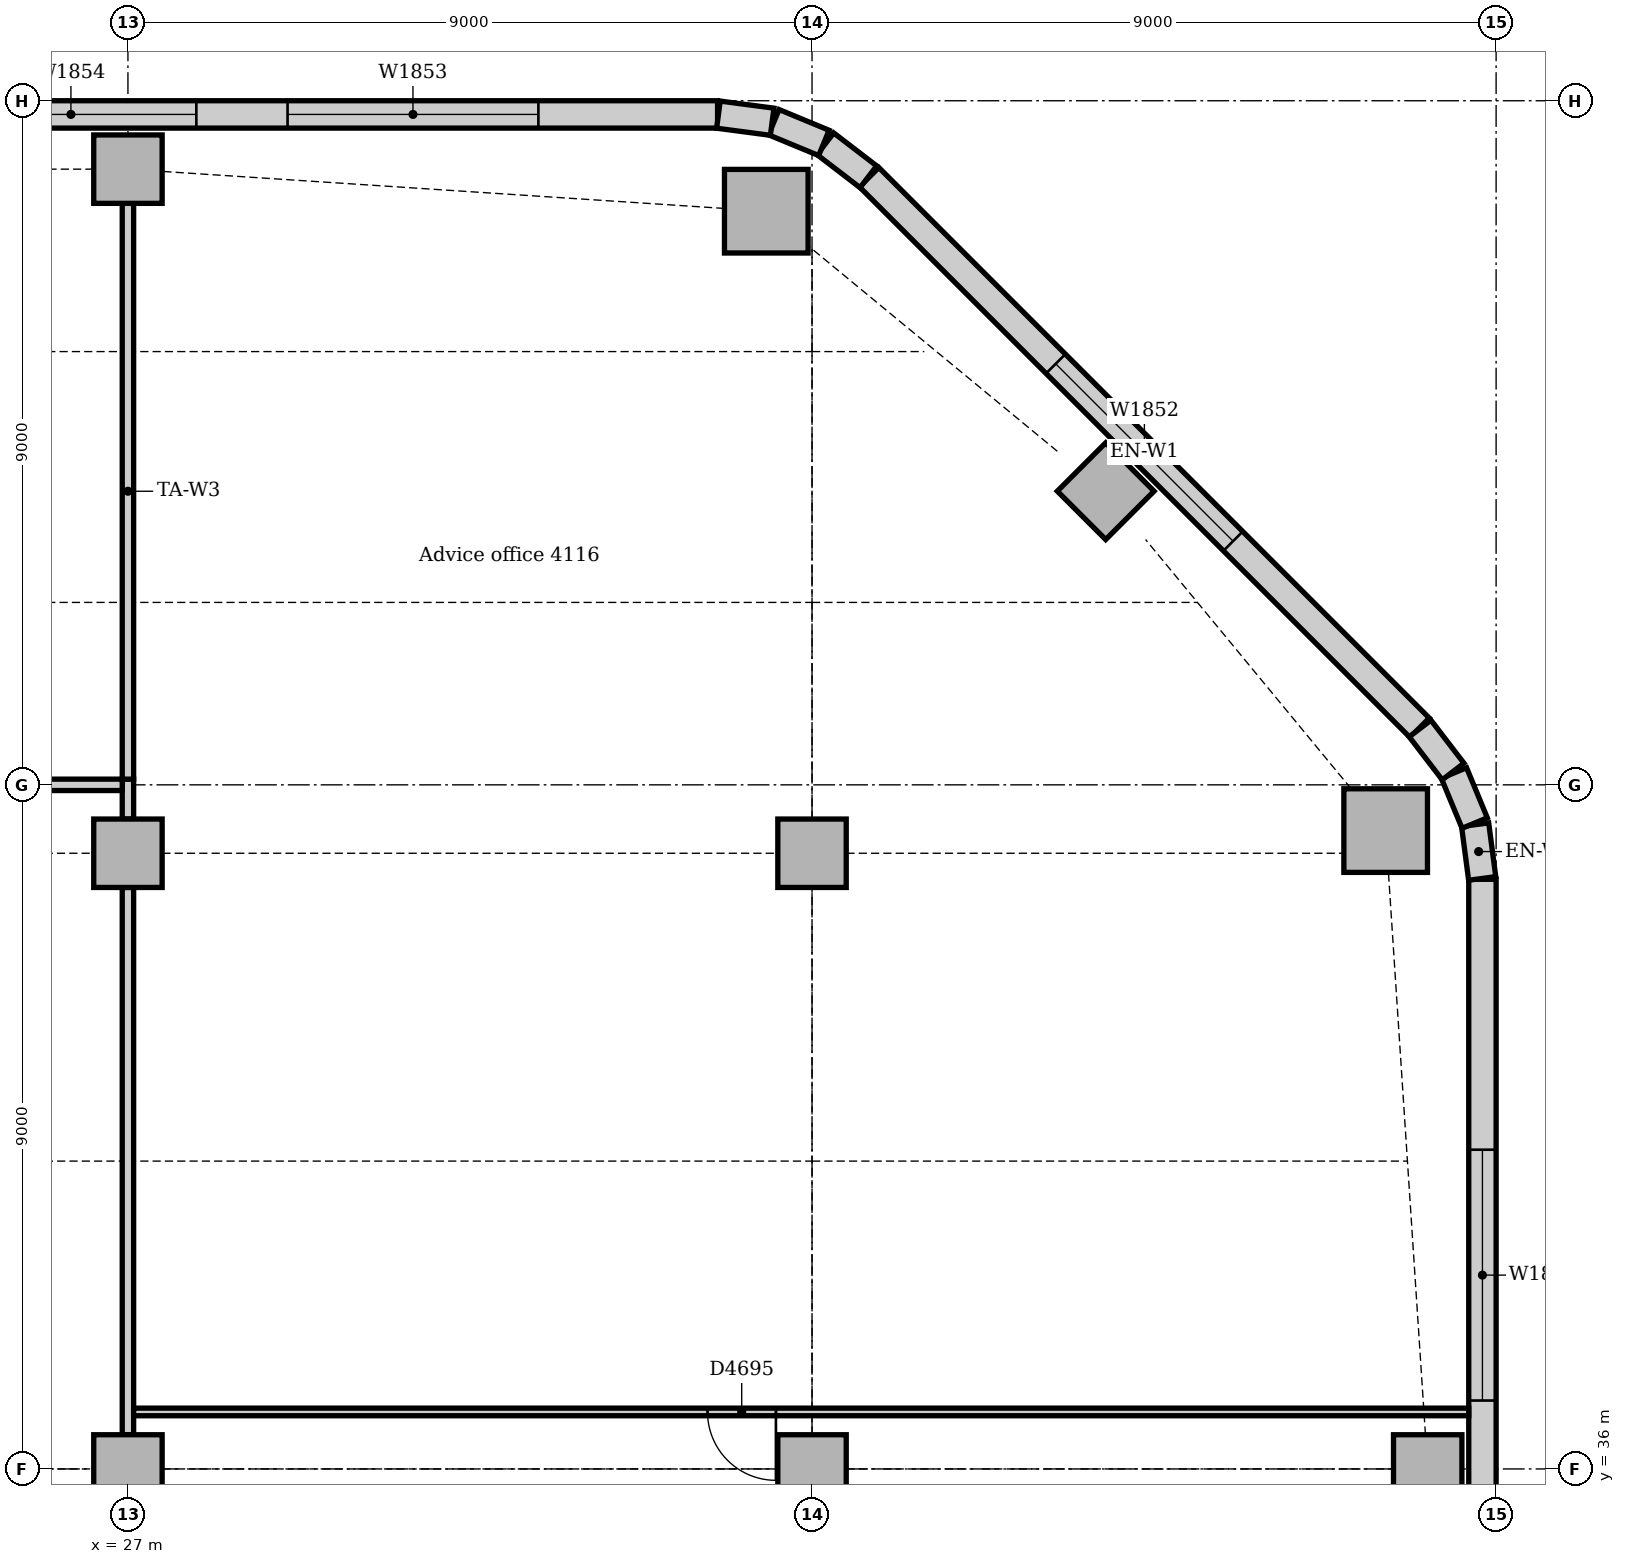
"""IFC4 building model, lengths in metres.
Left out: names, types, materials, properties, quantities, classifications, styles, units other than length and angle.
Written with IfcOpenShell. Run it as: python <this file> out.ifc"""

import sys

from ifc_helpers import new_model, si_unit, direction, frame, frame_2d, origin, origin_2d, place, context, subcontext, project, spatial, rectangle, extrude, element, fill, save


model = new_model("IFC4")
c1 = context("Model", 3, precision=1e-05, world=origin(), true_north=direction((0.0, 1.0)))
c2 = subcontext(c1, "Body", "Model", "MODEL_VIEW")
j1 = project(units=[si_unit("LENGTHUNIT", "METRE"), si_unit("PLANEANGLEUNIT", "RADIAN")], contexts=[c1])
p1 = place(None, origin())
s1 = spatial("IfcSite", under=j1, at=p1, CompositionType="ELEMENT")
p2 = place(p1, origin())
s2 = spatial("IfcBuilding", under=s1, at=p2, CompositionType="ELEMENT")
p3 = place(p2, frame((0.0, 0.0, 173.0)))
s3 = spatial("IfcBuildingStorey", under=s2, at=p3, CompositionType="ELEMENT", Elevation=173.0)
for number, where, z_axis, x_axis in (
    (1, (43.547, 44.398, 0.0), (0.0, 0.0, 1.0), (1.0, 0.0, 0.0)),
    (2, (35.398, 52.547, 0.0), (0.0, 0.0, 1.0), (1.0, 0.0, 0.0)),
):
    element("IfcColumn", number, at=place(p3, frame(where, z_axis=z_axis, x_axis=x_axis)), inside=s3, PredefinedType="COLUMN", context=c2, shape_type="SweptSolid", body=[
        extrude(rectangle(XDim=1.1, YDim=1.1, at=origin_2d()), origin(), (0.0, 0.0, 1.0), 3.85),
    ])
for number, where, z_axis, x_axis in (
    (3, (44.1, 36.0, 0.0), (0.0, 0.0, 1.0), (1.0, 0.0, 0.0)),
    (4, (39.864, 48.864, 0.0), (0.0, 0.0, 1.0), (0.707, 0.707, 0.0)),
    (5, (27.0, 53.1, 0.0), (0.0, 0.0, 1.0), (1.0, 0.0, 0.0)),
    (6, (27.0, 36.0, 0.0), (0.0, 0.0, 1.0), (1.0, 0.0, 0.0)),
    (7, (27.0, 44.1, 0.0), (0.0, 0.0, 1.0), (1.0, 0.0, 0.0)),
    (8, (36.0, 36.0, 0.0), (0.0, 0.0, 1.0), (1.0, 0.0, 0.0)),
    (9, (36.0, 44.1, 0.0), (0.0, 0.0, 1.0), (1.0, 0.0, 0.0)),
):
    element("IfcColumn", number, at=place(p3, frame(where, z_axis=z_axis, x_axis=x_axis)), inside=s3, PredefinedType="COLUMN", context=c2, shape_type="SweptSolid", body=[
        extrude(rectangle(XDim=0.9, YDim=0.9, at=origin_2d()), origin(), (0.0, 0.0, 1.0), 3.85),
    ])
p4 = place(p3, frame((44.82, 19.243, 0.0), z_axis=(0.0, 0.0, 1.0), x_axis=(0.0, 1.0, 0.0)))
e10 = element("IfcWall", 10, at=p4, inside=s3, PredefinedType="STANDARD", context=c2, shape_type="SweptSolid", body=[
    extrude(rectangle(XDim=24.515, YDim=0.36, at=frame_2d((12.257, 0.0))), origin(), (0.0, 0.0, 1.0), 3.85),
])
p5 = place(p4, frame((3.857, 0.0, 0.9)))
e11 = element("IfcOpeningElement", 11, at=p5, cuts=e10, PredefinedType="OPENING", context=c2, shape_type="SweptSolid", body=[
    extrude(rectangle(XDim=3.3, YDim=1.6, at=frame_2d((1.65, 0.8))), frame((0.0, 0.19, 0.0), z_axis=(0.0, -1.0, 0.0), x_axis=(1.0, 0.0, 0.0)), (0.0, 0.0, 1.0), 0.38),
])
p6 = place(p4, frame((8.357, 0.0, 0.9)))
e12 = element("IfcOpeningElement", 12, at=p6, cuts=e10, PredefinedType="OPENING", context=c2, shape_type="SweptSolid", body=[
    extrude(rectangle(XDim=3.3, YDim=1.6, at=frame_2d((1.65, 0.8))), frame((0.0, 0.19, 0.0), z_axis=(0.0, -1.0, 0.0), x_axis=(1.0, 0.0, 0.0)), (0.0, 0.0, 1.0), 0.38),
])
p7 = place(p4, frame((12.857, 0.0, 0.9)))
e13 = element("IfcOpeningElement", 13, at=p7, cuts=e10, PredefinedType="OPENING", context=c2, shape_type="SweptSolid", body=[
    extrude(rectangle(XDim=3.3, YDim=1.6, at=frame_2d((1.65, 0.8))), frame((0.0, 0.19, 0.0), z_axis=(0.0, -1.0, 0.0), x_axis=(1.0, 0.0, 0.0)), (0.0, 0.0, 1.0), 0.38),
])
p8 = place(p4, frame((17.657, 0.0, 0.9)))
e14 = element("IfcOpeningElement", 14, at=p8, cuts=e10, PredefinedType="OPENING", context=c2, shape_type="SweptSolid", body=[
    extrude(rectangle(XDim=3.3, YDim=1.6, at=frame_2d((1.65, 0.8))), frame((0.0, 0.19, 0.0), z_axis=(0.0, -1.0, 0.0), x_axis=(1.0, 0.0, 0.0)), (0.0, 0.0, 1.0), 0.38),
])
p9 = place(p3, frame((43.994, 45.751, 0.0), z_axis=(0.0, 0.0, 1.0), x_axis=(-0.707106781187, 0.707106781187, 0.0)))
e15 = element("IfcWall", 15, at=p9, inside=s3, PredefinedType="STANDARD", context=c2, shape_type="SweptSolid", body=[
    extrude(rectangle(XDim=10.243, YDim=0.36, at=frame_2d((5.121, 0.0))), origin(), (0.0, 0.0, 1.0), 3.85),
])
p10 = place(p9, frame((3.471, 0.0, 0.9)))
e16 = element("IfcOpeningElement", 16, at=p10, cuts=e15, PredefinedType="OPENING", context=c2, shape_type="SweptSolid", body=[
    extrude(rectangle(XDim=3.3, YDim=1.6, at=frame_2d((1.65, 0.8))), frame((0.0, 0.19, 0.0), z_axis=(0.0, -1.0, 0.0), x_axis=(1.0, 0.0, 0.0)), (0.0, 0.0, 1.0), 0.38),
])
p11 = place(p3, frame((34.757, 53.82, 0.0), z_axis=(0.0, 0.0, 1.0), x_axis=(-1.0, 0.0, 0.0)))
e17 = element("IfcWall", 17, at=p11, inside=s3, PredefinedType="STANDARD", context=c2, shape_type="SweptSolid", body=[
    extrude(rectangle(XDim=30.515, YDim=0.36, at=frame_2d((15.257, 0.0))), origin(), (0.0, 0.0, 1.0), 3.85),
])
p12 = place(p11, frame((2.357, 0.0, 0.9)))
e18 = element("IfcOpeningElement", 18, at=p12, cuts=e17, PredefinedType="OPENING", context=c2, shape_type="SweptSolid", body=[
    extrude(rectangle(XDim=3.3, YDim=1.6, at=frame_2d((1.65, 0.8))), frame((0.0, 0.19, 0.0), z_axis=(0.0, -1.0, 0.0), x_axis=(1.0, 0.0, 0.0)), (0.0, 0.0, 1.0), 0.38),
])
p13 = place(p11, frame((6.857, 0.0, 0.9)))
e19 = element("IfcOpeningElement", 19, at=p13, cuts=e17, PredefinedType="OPENING", context=c2, shape_type="SweptSolid", body=[
    extrude(rectangle(XDim=3.3, YDim=1.6, at=frame_2d((1.65, 0.8))), frame((0.0, 0.19, 0.0), z_axis=(0.0, -1.0, 0.0), x_axis=(1.0, 0.0, 0.0)), (0.0, 0.0, 1.0), 0.38),
])
p14 = place(p11, frame((11.357, 0.0, 0.9)))
e20 = element("IfcOpeningElement", 20, at=p14, cuts=e17, PredefinedType="OPENING", context=c2, shape_type="SweptSolid", body=[
    extrude(rectangle(XDim=3.3, YDim=1.6, at=frame_2d((1.65, 0.8))), frame((0.0, 0.19, 0.0), z_axis=(0.0, -1.0, 0.0), x_axis=(1.0, 0.0, 0.0)), (0.0, 0.0, 1.0), 0.38),
])
p15 = place(p11, frame((15.857, 0.0, 0.9)))
e21 = element("IfcOpeningElement", 21, at=p15, cuts=e17, PredefinedType="OPENING", context=c2, shape_type="SweptSolid", body=[
    extrude(rectangle(XDim=3.3, YDim=1.6, at=frame_2d((1.65, 0.8))), frame((0.0, 0.19, 0.0), z_axis=(0.0, -1.0, 0.0), x_axis=(1.0, 0.0, 0.0)), (0.0, 0.0, 1.0), 0.38),
])
p16 = place(p11, frame((20.357, 0.0, 0.9)))
e22 = element("IfcOpeningElement", 22, at=p16, cuts=e17, PredefinedType="OPENING", context=c2, shape_type="SweptSolid", body=[
    extrude(rectangle(XDim=3.3, YDim=1.6, at=frame_2d((1.65, 0.8))), frame((0.0, 0.19, 0.0), z_axis=(0.0, -1.0, 0.0), x_axis=(1.0, 0.0, 0.0)), (0.0, 0.0, 1.0), 0.38),
])
p17 = place(p11, frame((24.857, 0.0, 0.9)))
e23 = element("IfcOpeningElement", 23, at=p17, cuts=e17, PredefinedType="OPENING", context=c2, shape_type="SweptSolid", body=[
    extrude(rectangle(XDim=3.3, YDim=1.6, at=frame_2d((1.65, 0.8))), frame((0.0, 0.19, 0.0), z_axis=(0.0, -1.0, 0.0), x_axis=(1.0, 0.0, 0.0)), (0.0, 0.0, 1.0), 0.38),
])
for number, where, z_axis, x_axis in (
    (24, (44.817, 43.769, 0.0), (0.0, 0.0, 1.0), (-0.131, 0.991, 0.0)),
    (25, (44.718, 44.497, 0.0), (0.0, 0.0, 1.0), (-0.383, 0.924, 0.0)),
):
    element("IfcWall", number, at=place(p3, frame(where, z_axis=z_axis, x_axis=x_axis)), inside=s3, PredefinedType="STANDARD", context=c2, shape_type="SweptSolid", body=[
        extrude(rectangle(XDim=0.713, YDim=0.36, at=frame_2d((0.356, 0.0))), origin(), (0.0, 0.0, 1.0), 3.85),
    ])
for number, where, z_axis, x_axis in (
    (26, (44.434, 45.175, 0.0), (0.0, 0.0, 1.0), (-0.609, 0.793, 0.0)),
    (27, (36.741, 53.0, 0.0), (0.0, 0.0, 1.0), (-0.793, 0.609, 0.0)),
):
    element("IfcWall", number, at=place(p3, frame(where, z_axis=z_axis, x_axis=x_axis)), inside=s3, PredefinedType="STANDARD", context=c2, shape_type="SweptSolid", body=[
        extrude(rectangle(XDim=0.713, YDim=0.36, at=frame_2d((0.357, 0.0))), origin(), (0.0, 0.0, 1.0), 3.85),
    ])
for number, where, z_axis, x_axis in (
    (28, (36.156, 53.445, 0.0), (0.0, 0.0, 1.0), (-0.924, 0.383, 0.0)),
    (29, (35.476, 53.724, 0.0), (0.0, 0.0, 1.0), (-0.991, 0.131, 0.0)),
):
    element("IfcWall", number, at=place(p3, frame(where, z_axis=z_axis, x_axis=x_axis)), inside=s3, PredefinedType="STANDARD", context=c2, shape_type="SweptSolid", body=[
        extrude(rectangle(XDim=0.713, YDim=0.36, at=frame_2d((0.356, 0.0))), origin(), (0.0, 0.0, 1.0), 3.85),
    ])
p18 = place(p3, frame((27.0, 36.45, 0.0), z_axis=(0.0, 0.0, 1.0), x_axis=(0.0, 1.0, 0.0)))
e30 = element("IfcWall", 30, at=p18, inside=s3, PredefinedType="PARTITIONING", context=c2, shape_type="SweptSolid", body=[
    extrude(rectangle(XDim=7.2, YDim=0.15, at=frame_2d((3.6, 0.0))), origin(), (0.0, 0.0, 1.0), 3.362),
])
p19 = place(p3, frame((27.0, 44.55, 0.0), z_axis=(0.0, 0.0, 1.0), x_axis=(0.0, 1.0, 0.0)))
e31 = element("IfcWall", 31, at=p19, inside=s3, PredefinedType="PARTITIONING", context=c2, shape_type="SweptSolid", body=[
    extrude(rectangle(XDim=0.525, YDim=0.15, at=frame_2d((0.263, 0.0))), origin(), (0.0, 0.0, 1.0), 3.362),
])
p20 = place(p3, frame((22.425, 45.0, 0.0), z_axis=(0.0, 0.0, 1.0), x_axis=(1.0, 0.0, 0.0)))
e32 = element("IfcWall", 32, at=p20, inside=s3, PredefinedType="PARTITIONING", context=c2, shape_type="SweptSolid", body=[
    extrude(rectangle(XDim=4.5, YDim=0.15, at=frame_2d((2.25, 0.0))), origin(), (0.0, 0.0, 1.0), 3.85),
])
p21 = place(p20, frame((1.75, 0.0, 0.0)))
e33 = element("IfcOpeningElement", 33, at=p21, cuts=e32, PredefinedType="OPENING", context=c2, shape_type="SweptSolid", body=[
    extrude(rectangle(XDim=1.0, YDim=2.1, at=frame_2d((0.5, 1.05))), frame((0.0, 0.085, 0.0), z_axis=(0.0, -1.0, 0.0), x_axis=(1.0, 0.0, 0.0)), (0.0, 0.0, 1.0), 0.17),
])
p22 = place(p3, frame((27.0, 45.075, 0.0), z_axis=(0.0, 0.0, 1.0), x_axis=(0.0, 1.0, 0.0)))
e34 = element("IfcWall", 34, at=p22, inside=s3, PredefinedType="PARTITIONING", context=c2, shape_type="SweptSolid", body=[
    extrude(rectangle(XDim=7.575, YDim=0.15, at=frame_2d((3.788, 0.0))), origin(), (0.0, 0.0, 1.0), 3.362),
])
p23 = place(p3, frame((27.075, 36.75, 0.0), z_axis=(0.0, 0.0, 1.0), x_axis=(1.0, 0.0, 0.0)))
e35 = element("IfcWall", 35, at=p23, inside=s3, PredefinedType="PARTITIONING", context=c2, shape_type="SweptSolid", body=[
    extrude(rectangle(XDim=17.565, YDim=0.1, at=frame_2d((8.783, 0.0))), origin(), (0.0, 0.0, 1.0), 3.85),
])
p24 = place(p23, frame((7.55, 0.0, 0.0)))
e36 = element("IfcOpeningElement", 36, at=p24, cuts=e35, PredefinedType="OPENING", context=c2, shape_type="SweptSolid", body=[
    extrude(rectangle(XDim=0.9, YDim=2.1, at=frame_2d((0.45, 1.05))), frame((0.0, 0.06, 0.0), z_axis=(0.0, -1.0, 0.0), x_axis=(1.0, 0.0, 0.0)), (0.0, 0.0, 1.0), 0.12),
])
p25 = place(p8, origin())
e37 = element("IfcWindow", 37, at=p25, inside=s3, PartitioningType="SINGLE_PANEL", PredefinedType="WINDOW", context=c2, shape_type="SweptSolid", body=[
    extrude(rectangle(XDim=3.3, YDim=1.6, at=frame_2d((1.65, 0.8))), frame((0.0, 0.13, 0.0), z_axis=(0.0, -1.0, 0.0), x_axis=(1.0, 0.0, 0.0)), (0.0, 0.0, 1.0), 0.06),
])
fill(e14, e37)
p26 = place(p10, origin())
e38 = element("IfcWindow", 38, at=p26, inside=s3, PartitioningType="SINGLE_PANEL", PredefinedType="WINDOW", context=c2, shape_type="SweptSolid", body=[
    extrude(rectangle(XDim=3.3, YDim=1.6, at=frame_2d((1.65, 0.8))), frame((0.0, 0.13, 0.0), z_axis=(0.0, -1.0, 0.0), x_axis=(1.0, 0.0, 0.0)), (0.0, 0.0, 1.0), 0.06),
])
fill(e16, e38)
p27 = place(p12, origin())
e39 = element("IfcWindow", 39, at=p27, inside=s3, PartitioningType="SINGLE_PANEL", PredefinedType="WINDOW", context=c2, shape_type="SweptSolid", body=[
    extrude(rectangle(XDim=3.3, YDim=1.6, at=frame_2d((1.65, 0.8))), frame((0.0, 0.13, 0.0), z_axis=(0.0, -1.0, 0.0), x_axis=(1.0, 0.0, 0.0)), (0.0, 0.0, 1.0), 0.06),
])
fill(e18, e39)
p28 = place(p13, origin())
e40 = element("IfcWindow", 40, at=p28, inside=s3, PartitioningType="SINGLE_PANEL", PredefinedType="WINDOW", context=c2, shape_type="SweptSolid", body=[
    extrude(rectangle(XDim=3.3, YDim=1.6, at=frame_2d((1.65, 0.8))), frame((0.0, 0.13, 0.0), z_axis=(0.0, -1.0, 0.0), x_axis=(1.0, 0.0, 0.0)), (0.0, 0.0, 1.0), 0.06),
])
fill(e19, e40)
p29 = place(p24, frame((0.9, 0.0, 0.0), z_axis=(0.0, 0.0, 1.0), x_axis=(-1.0, 0.0, 0.0)))
e41 = element("IfcDoor", 41, at=p29, inside=s3, OperationType="SINGLE_SWING_LEFT", PredefinedType="DOOR", context=c2, shape_type="SweptSolid", body=[
    extrude(rectangle(XDim=0.9, YDim=2.1, at=frame_2d((0.45, 1.05))), frame((0.0, 0.025, 0.0), z_axis=(0.0, -1.0, 0.0), x_axis=(1.0, 0.0, 0.0)), (0.0, 0.0, 1.0), 0.05),
])
fill(e36, e41)
save(model, sys.argv[1])
